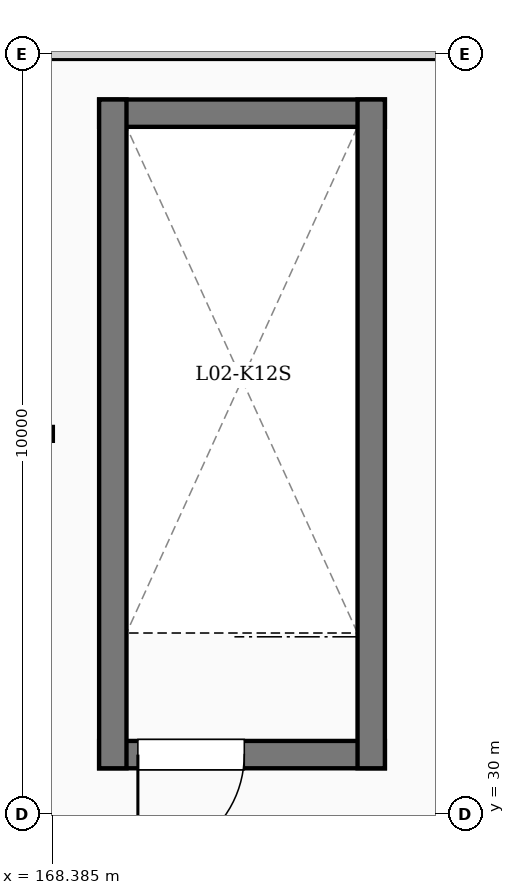
"""IFC4 building model, lengths in metres.
Left out: names, types, materials, properties, quantities, classifications, styles, units other than length and angle.
Written with IfcOpenShell. Run it as: python <this file> out.ifc"""

import sys

from ifc_helpers import new_model, si_unit, direction, frame, frame_2d, origin, place, context, subcontext, project, spatial, rectangle, extrude, element, fill, save


model = new_model("IFC4")
c1 = context("Model", 3, precision=1e-05, world=origin(), true_north=direction((0.0, 1.0)))
c2 = subcontext(c1, "Body", "Model", "MODEL_VIEW")
j1 = project(units=[si_unit("LENGTHUNIT", "METRE"), si_unit("PLANEANGLEUNIT", "RADIAN")], contexts=[c1])
p1 = place(None, origin())
s1 = spatial("IfcSite", under=j1, at=p1, CompositionType="ELEMENT")
p2 = place(p1, origin())
s2 = spatial("IfcBuilding", under=s1, at=p2, CompositionType="ELEMENT")
p3 = place(p2, frame((0.0, 0.0, 10.2)))
s3 = spatial("IfcBuildingStorey", under=s2, at=p3, CompositionType="ELEMENT", Elevation=10.2)
p4 = place(p3, frame((169.0, 30.78, 0.0), z_axis=(0.0, 0.0, 1.0), x_axis=(1.0, 0.0, 0.0)))
e1 = element("IfcWall", 1, at=p4, inside=s3, PredefinedType="SHEAR", context=c2, shape_type="SweptSolid", body=[
    extrude(rectangle(XDim=3.76, YDim=0.36, at=frame_2d((1.88, 0.0))), origin(), (0.0, 0.0, 1.0), 3.65),
])
p5 = place(p4, frame((0.51, 0.0, 0.0)))
e2 = element("IfcOpeningElement", 2, at=p5, cuts=e1, PredefinedType="OPENING", context=c2, shape_type="SweptSolid", body=[
    extrude(rectangle(XDim=1.4, YDim=2.35, at=frame_2d((0.7, 1.175))), frame((0.0, 0.19, 0.0), z_axis=(0.0, -1.0, 0.0), x_axis=(1.0, 0.0, 0.0)), (0.0, 0.0, 1.0), 0.38),
])
p6 = place(p3, frame((169.0, 39.22, 0.0), z_axis=(0.0, 0.0, 1.0), x_axis=(1.0, 0.0, 0.0)))
e3 = element("IfcWall", 3, at=p6, inside=s3, PredefinedType="SHEAR", context=c2, shape_type="SweptSolid", body=[
    extrude(rectangle(XDim=3.76, YDim=0.36, at=frame_2d((1.88, 0.0))), origin(), (0.0, 0.0, 1.0), 3.65),
])
for number, where, z_axis, x_axis in (
    (4, (169.18, 30.6, 0.0), (0.0, 0.0, 1.0), (0.0, 1.0, 0.0)),
    (5, (172.58, 30.6, 0.0), (0.0, 0.0, 1.0), (0.0, 1.0, 0.0)),
):
    element("IfcWall", number, at=place(p3, frame(where, z_axis=z_axis, x_axis=x_axis)), inside=s3, PredefinedType="SHEAR", context=c2, shape_type="SweptSolid", body=[
        extrude(rectangle(XDim=8.8, YDim=0.36, at=frame_2d((4.4, 0.0))), origin(), (0.0, 0.0, 1.0), 3.65),
    ])
p7 = place(p3, frame((156.6, 35.0, 0.0), z_axis=(0.0, 0.0, 1.0), x_axis=(1.0, 0.0, 0.0)))
e6 = element("IfcWall", 6, at=p7, inside=s3, PredefinedType="PARTITIONING", context=c2, shape_type="SweptSolid", body=[
    extrude(rectangle(XDim=11.8, YDim=0.2, at=frame_2d((5.9, 0.0))), origin(), (0.0, 0.0, 1.0), 3.86),
])
p8 = place(p7, frame((2.342, 0.0, 0.0)))
e7 = element("IfcOpeningElement", 7, at=p8, cuts=e6, PredefinedType="OPENING", context=c2, shape_type="SweptSolid", body=[
    extrude(rectangle(XDim=0.98, YDim=2.3, at=frame_2d((0.49, 1.15))), frame((0.0, 0.11, 0.0), z_axis=(0.0, -1.0, 0.0), x_axis=(1.0, 0.0, 0.0)), (0.0, 0.0, 1.0), 0.22),
])
p9 = place(p7, frame((8.428, 0.0, 0.0)))
e8 = element("IfcOpeningElement", 8, at=p9, cuts=e6, PredefinedType="OPENING", context=c2, shape_type="SweptSolid", body=[
    extrude(rectangle(XDim=1.08, YDim=2.35, at=frame_2d((0.54, 1.175))), frame((0.0, 0.11, 0.0), z_axis=(0.0, -1.0, 0.0), x_axis=(1.0, 0.0, 0.0)), (0.0, 0.0, 1.0), 0.22),
])
p10 = place(p3, frame((156.6, 40.0, 0.0), z_axis=(0.0, 0.0, 1.0), x_axis=(1.0, 0.0, 0.0)))
e9 = element("IfcWall", 9, at=p10, inside=s3, PredefinedType="PARTITIONING", context=c2, shape_type="SweptSolid", body=[
    extrude(rectangle(XDim=18.6, YDim=0.15, at=frame_2d((9.3, 0.0))), origin(), (0.0, 0.0, 1.0), 3.86),
])
p11 = place(p5, origin())
e10 = element("IfcDoor", 10, at=p11, inside=s3, OperationType="SINGLE_SWING_LEFT", PredefinedType="DOOR", context=c2, shape_type="SweptSolid", body=[
    extrude(rectangle(XDim=1.4, YDim=2.35, at=frame_2d((0.7, 1.175))), frame((0.0, 0.025, 0.0), z_axis=(0.0, -1.0, 0.0), x_axis=(1.0, 0.0, 0.0)), (0.0, 0.0, 1.0), 0.05),
])
fill(e2, e10)
save(model, sys.argv[1])
